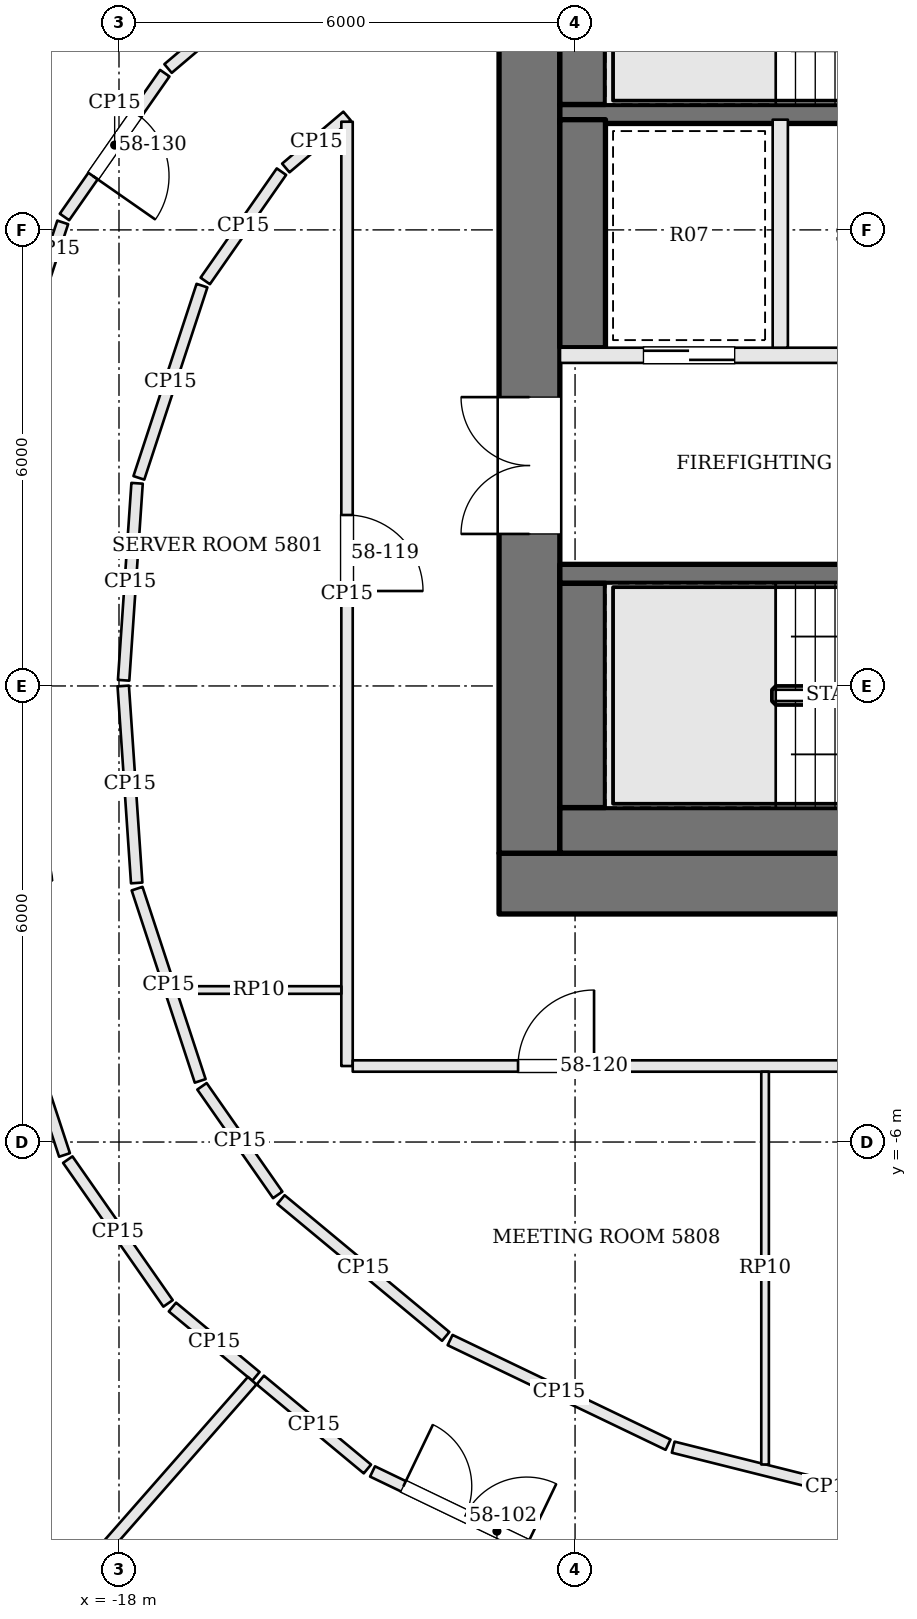
"""IFC4 building model, lengths in metres.
Left out: names, types, materials, properties, quantities, classifications, styles, units other than length and angle.
Written with IfcOpenShell. Run it as: python <this file> out.ifc"""

import sys

from ifc_helpers import new_model, si_unit, direction, frame, frame_2d, origin, place, context, subcontext, project, spatial, rectangle, extrude, element, fill, save


model = new_model("IFC4")
c1 = context("Model", 3, precision=1e-05, world=origin(), true_north=direction((0.0, 1.0)))
c2 = subcontext(c1, "Body", "Model", "MODEL_VIEW")
j1 = project(units=[si_unit("LENGTHUNIT", "METRE"), si_unit("PLANEANGLEUNIT", "RADIAN")], contexts=[c1])
p1 = place(None, origin())
s1 = spatial("IfcSite", under=j1, at=p1, CompositionType="ELEMENT")
p2 = place(p1, origin())
s2 = spatial("IfcBuilding", under=s1, at=p2, CompositionType="ELEMENT")
p3 = place(p2, frame((0.0, 0.0, 237.0)))
s3 = spatial("IfcBuildingStorey", under=s2, at=p3, CompositionType="ELEMENT", Elevation=237.0)
p4 = place(p3, frame((-13.0, -2.6, 0.0), z_axis=(0.0, 0.0, 1.0), x_axis=(1.0, 0.0, 0.0)))
e1 = element("IfcWall", 1, at=p4, inside=s3, PredefinedType="SHEAR", context=c2, shape_type="SweptSolid", body=[
    extrude(rectangle(XDim=26.0, YDim=0.8, at=frame_2d((13.0, 0.0))), origin(), (0.0, 0.0, 1.0), 3.9),
])
p5 = place(p4, frame((8.5, 0.0, 0.0)))
e2 = element("IfcOpeningElement", 2, at=p5, cuts=e1, PredefinedType="OPENING", context=c2, shape_type="SweptSolid", body=[
    extrude(rectangle(XDim=1.0, YDim=2.1, at=frame_2d((0.5, 1.05))), frame((0.0, 0.41, 0.0), z_axis=(0.0, -1.0, 0.0), x_axis=(1.0, 0.0, 0.0)), (0.0, 0.0, 1.0), 0.82),
])
p6 = place(p4, frame((11.025, 0.0, 0.0)))
e3 = element("IfcOpeningElement", 3, at=p6, cuts=e1, PredefinedType="OPENING", context=c2, shape_type="SweptSolid", body=[
    extrude(rectangle(XDim=0.9, YDim=2.1, at=frame_2d((0.45, 1.05))), frame((0.0, 0.41, 0.0), z_axis=(0.0, -1.0, 0.0), x_axis=(1.0, 0.0, 0.0)), (0.0, 0.0, 1.0), 0.82),
])
p7 = place(p4, frame((14.225, 0.0, 0.0)))
e4 = element("IfcOpeningElement", 4, at=p7, cuts=e1, PredefinedType="OPENING", context=c2, shape_type="SweptSolid", body=[
    extrude(rectangle(XDim=0.9, YDim=2.1, at=frame_2d((0.45, 1.05))), frame((0.0, 0.41, 0.0), z_axis=(0.0, -1.0, 0.0), x_axis=(1.0, 0.0, 0.0)), (0.0, 0.0, 1.0), 0.82),
])
p8 = place(p4, frame((16.6, 0.0, 0.0)))
e5 = element("IfcOpeningElement", 5, at=p8, cuts=e1, PredefinedType="OPENING", context=c2, shape_type="SweptSolid", body=[
    extrude(rectangle(XDim=1.0, YDim=2.1, at=frame_2d((0.5, 1.05))), frame((0.0, 0.41, 0.0), z_axis=(0.0, -1.0, 0.0), x_axis=(1.0, 0.0, 0.0)), (0.0, 0.0, 1.0), 0.82),
])
p9 = place(p3, frame((-12.6, -2.2, 0.0), z_axis=(0.0, 0.0, 1.0), x_axis=(0.0, 1.0, 0.0)))
e6 = element("IfcWall", 6, at=p9, inside=s3, PredefinedType="SHEAR", context=c2, shape_type="SweptSolid", body=[
    extrude(rectangle(XDim=13.4, YDim=0.8, at=frame_2d((6.7, 0.0))), origin(), (0.0, 0.0, 1.0), 3.9),
])
p10 = place(p9, frame((4.2, 0.0, 0.0)))
e7 = element("IfcOpeningElement", 7, at=p10, cuts=e6, PredefinedType="OPENING", context=c2, shape_type="SweptSolid", body=[
    extrude(rectangle(XDim=1.8, YDim=2.1, at=frame_2d((0.9, 1.05))), frame((0.0, 0.41, 0.0), z_axis=(0.0, -1.0, 0.0), x_axis=(1.0, 0.0, 0.0)), (0.0, 0.0, 1.0), 0.82),
])
p11 = place(p3, frame((-12.2, 1.475, 0.0), z_axis=(0.0, 0.0, 1.0), x_axis=(1.0, 0.0, 0.0)))
e8 = element("IfcWall", 8, at=p11, inside=s3, PredefinedType="SOLIDWALL", context=c2, shape_type="SweptSolid", body=[
    extrude(rectangle(XDim=7.1, YDim=0.25, at=frame_2d((3.55, 0.0))), origin(), (0.0, 0.0, 1.0), 3.7),
])
p12 = place(p11, frame((5.8, 0.0, 0.0)))
e9 = element("IfcOpeningElement", 9, at=p12, cuts=e8, PredefinedType="OPENING", context=c2, shape_type="SweptSolid", body=[
    extrude(rectangle(XDim=1.2, YDim=2.1, at=frame_2d((0.6, 1.05))), frame((0.0, 0.135, 0.0), z_axis=(0.0, -1.0, 0.0), x_axis=(1.0, 0.0, 0.0)), (0.0, 0.0, 1.0), 0.27),
])
p13 = place(p3, frame((-12.2, 4.35, 0.0), z_axis=(0.0, 0.0, 1.0), x_axis=(1.0, 0.0, 0.0)))
e10 = element("IfcWall", 10, at=p13, inside=s3, PredefinedType="SOLIDWALL", context=c2, shape_type="SweptSolid", body=[
    extrude(rectangle(XDim=7.1, YDim=0.2, at=frame_2d((3.55, 0.0))), origin(), (0.0, 0.0, 1.0), 3.7),
])
p14 = place(p13, frame((4.4, 0.0, 0.0)))
e11 = element("IfcOpeningElement", 11, at=p14, cuts=e10, PredefinedType="OPENING", context=c2, shape_type="SweptSolid", body=[
    extrude(rectangle(XDim=1.2, YDim=2.1, at=frame_2d((0.6, 1.05))), frame((0.0, 0.11, 0.0), z_axis=(0.0, -1.0, 0.0), x_axis=(1.0, 0.0, 0.0)), (0.0, 0.0, 1.0), 0.22),
])
p15 = place(p13, frame((1.1, 0.0, 0.0)))
e12 = element("IfcOpeningElement", 12, at=p15, cuts=e10, PredefinedType="OPENING", context=c2, shape_type="SweptSolid", body=[
    extrude(rectangle(XDim=1.2, YDim=2.1, at=frame_2d((0.6, 1.05))), frame((0.0, 0.11, 0.0), z_axis=(0.0, -1.0, 0.0), x_axis=(1.0, 0.0, 0.0)), (0.0, 0.0, 1.0), 0.22),
])
p16 = place(p3, frame((-12.2, 7.525, 0.0), z_axis=(0.0, 0.0, 1.0), x_axis=(1.0, 0.0, 0.0)))
e13 = element("IfcWall", 13, at=p16, inside=s3, PredefinedType="SOLIDWALL", context=c2, shape_type="SweptSolid", body=[
    extrude(rectangle(XDim=7.1, YDim=0.25, at=frame_2d((3.55, 0.0))), origin(), (0.0, 0.0, 1.0), 3.7),
])
p17 = place(p16, frame((5.8, 0.0, 0.0)))
e14 = element("IfcOpeningElement", 14, at=p17, cuts=e13, PredefinedType="OPENING", context=c2, shape_type="SweptSolid", body=[
    extrude(rectangle(XDim=1.2, YDim=2.1, at=frame_2d((0.6, 1.05))), frame((0.0, 0.135, 0.0), z_axis=(0.0, -1.0, 0.0), x_axis=(1.0, 0.0, 0.0)), (0.0, 0.0, 1.0), 0.27),
])
p18 = place(p3, frame((-9.3, 4.45, 0.0), z_axis=(0.0, 0.0, 1.0), x_axis=(0.0, 1.0, 0.0)))
e15 = element("IfcWall", 15, at=p18, inside=s3, PredefinedType="SOLIDWALL", context=c2, shape_type="SweptSolid", body=[
    extrude(rectangle(XDim=3.0, YDim=0.2, at=frame_2d((1.5, 0.0))), origin(), (0.0, 0.0, 1.0), 3.7),
])
p19 = place(p3, frame((-12.2, -1.9, 0.0), z_axis=(0.0, 0.0, 1.0), x_axis=(1.0, 0.0, 0.0)))
e16 = element("IfcWall", 16, at=p19, inside=s3, PredefinedType="SOLIDWALL", context=c2, shape_type="SweptSolid", body=[
    extrude(rectangle(XDim=7.1, YDim=0.6, at=frame_2d((3.55, 0.0))), origin(), (0.0, 0.0, 1.0), 3.7),
])
p20 = place(p3, frame((-11.9, -1.6, 0.0), z_axis=(0.0, 0.0, 1.0), x_axis=(0.0, 1.0, 0.0)))
e17 = element("IfcWall", 17, at=p20, inside=s3, PredefinedType="SOLIDWALL", context=c2, shape_type="SweptSolid", body=[
    extrude(rectangle(XDim=2.95, YDim=0.6, at=frame_2d((1.475, 0.0))), origin(), (0.0, 0.0, 1.0), 3.7),
])
p21 = place(p3, frame((-11.9, 4.45, 0.0), z_axis=(0.0, 0.0, 1.0), x_axis=(0.0, 1.0, 0.0)))
e18 = element("IfcWall", 18, at=p21, inside=s3, PredefinedType="SOLIDWALL", context=c2, shape_type="SweptSolid", body=[
    extrude(rectangle(XDim=3.0, YDim=0.6, at=frame_2d((1.5, 0.0))), origin(), (0.0, 0.0, 1.0), 3.7),
])
p22 = place(p3, frame((-11.9, 7.65, 0.0), z_axis=(0.0, 0.0, 1.0), x_axis=(0.0, 1.0, 0.0)))
e19 = element("IfcWall", 19, at=p22, inside=s3, PredefinedType="SOLIDWALL", context=c2, shape_type="SweptSolid", body=[
    extrude(rectangle(XDim=2.95, YDim=0.6, at=frame_2d((1.475, 0.0))), origin(), (0.0, 0.0, 1.0), 3.7),
])
p23 = place(p3, frame((-19.717, -3.124, 0.0), z_axis=(0.0, 0.0, 1.0), x_axis=(0.31188427026, -0.950120098706, 0.0)))
e20 = element("IfcWall", 20, at=p23, inside=s3, PredefinedType="PARTITIONING", context=c2, shape_type="SweptSolid", body=[
    extrude(rectangle(XDim=3.206, YDim=0.15, at=frame_2d((1.603, 0.0))), origin(), (0.0, 0.0, 1.0), 3.084),
])
p24 = place(p3, frame((-18.674, -6.232, 0.0), z_axis=(0.0, 0.0, 1.0), x_axis=(0.572118665737, -0.820170855563, 0.0)))
e21 = element("IfcWall", 21, at=p24, inside=s3, PredefinedType="PARTITIONING", context=c2, shape_type="SweptSolid", body=[
    extrude(rectangle(XDim=2.306, YDim=0.15, at=frame_2d((1.153, 0.0))), origin(), (0.0, 0.0, 1.0), 3.084),
])
p25 = place(p3, frame((-17.297, -8.171, 0.0), z_axis=(0.0, 0.0, 1.0), x_axis=(0.769229150867, -0.638973014654, 0.0)))
e22 = element("IfcWall", 22, at=p25, inside=s3, PredefinedType="PARTITIONING", context=c2, shape_type="SweptSolid", body=[
    extrude(rectangle(XDim=1.428, YDim=0.15, at=frame_2d((0.714, 0.0))), origin(), (0.0, 0.0, 1.0), 3.084),
])
p26 = place(p3, frame((-21.493, -15.114, 0.0), z_axis=(0.0, 0.0, 1.0), x_axis=(0.659784254939, 0.751455079785, 0.0)))
e23 = element("IfcWall", 23, at=p26, inside=s3, PredefinedType="PARTITIONING", context=c2, shape_type="SweptSolid", body=[
    extrude(rectangle(XDim=7.95, YDim=0.15, at=frame_2d((3.975, 0.0))), origin(), (0.0, 0.0, 1.0), 3.184),
])
p27 = place(p3, frame((-16.141, -9.131, 0.0), z_axis=(0.0, 0.0, 1.0), x_axis=(0.769225656115, -0.638977221796, 0.0)))
e24 = element("IfcWall", 24, at=p27, inside=s3, PredefinedType="PARTITIONING", context=c2, shape_type="SweptSolid", body=[
    extrude(rectangle(XDim=1.831, YDim=0.15, at=frame_2d((0.916, 0.0))), origin(), (0.0, 0.0, 1.0), 3.084),
])
p28 = place(p3, frame((-14.664, -10.334, 0.0), z_axis=(0.0, 0.0, 1.0), x_axis=(0.901507315282, -0.432763862278, 0.0)))
e25 = element("IfcWall", 25, at=p28, inside=s3, PredefinedType="PARTITIONING", context=c2, shape_type="SweptSolid", body=[
    extrude(rectangle(XDim=3.63, YDim=0.15, at=frame_2d((1.815, 0.0))), origin(), (0.0, 0.0, 1.0), 3.084),
])
p29 = place(p28, frame((0.45, 0.0, 0.0)))
e26 = element("IfcOpeningElement", 26, at=p29, cuts=e25, PredefinedType="OPENING", context=c2, shape_type="SweptSolid", body=[
    extrude(rectangle(XDim=1.8, YDim=2.1, at=frame_2d((0.9, 1.05))), frame((0.0, 0.085, 0.0), z_axis=(0.0, -1.0, 0.0), x_axis=(1.0, 0.0, 0.0)), (0.0, 0.0, 1.0), 0.17),
])
p30 = place(p3, frame((-15.057, 10.073, 0.0), z_axis=(0.0, 0.0, 1.0), x_axis=(-0.762398905861, -0.647107339119, 0.0)))
e27 = element("IfcWall", 27, at=p30, inside=s3, PredefinedType="PARTITIONING", context=c2, shape_type="SweptSolid", body=[
    extrude(rectangle(XDim=3.013, YDim=0.15, at=frame_2d((1.507, 0.0))), origin(), (0.0, 0.0, 1.0), 3.084),
])
p31 = place(p3, frame((-17.397, 8.062, 0.0), z_axis=(0.0, 0.0, 1.0), x_axis=(-0.572118665737, -0.820170855563, 0.0)))
e28 = element("IfcWall", 28, at=p31, inside=s3, PredefinedType="PARTITIONING", context=c2, shape_type="SweptSolid", body=[
    extrude(rectangle(XDim=2.306, YDim=0.15, at=frame_2d((1.153, 0.0))), origin(), (0.0, 0.0, 1.0), 3.084),
])
p32 = place(p31, frame((0.65, 0.0, 0.0)))
e29 = element("IfcOpeningElement", 29, at=p32, cuts=e28, PredefinedType="OPENING", context=c2, shape_type="SweptSolid", body=[
    extrude(rectangle(XDim=1.0, YDim=2.1, at=frame_2d((0.5, 1.05))), frame((0.0, 0.085, 0.0), z_axis=(0.0, -1.0, 0.0), x_axis=(1.0, 0.0, 0.0)), (0.0, 0.0, 1.0), 0.17),
])
p33 = place(p3, frame((-18.74, 6.099, 0.0), z_axis=(0.0, 0.0, 1.0), x_axis=(-0.311930077778, -0.95010506081, 0.0)))
e30 = element("IfcWall", 30, at=p33, inside=s3, PredefinedType="PARTITIONING", context=c2, shape_type="SweptSolid", body=[
    extrude(rectangle(XDim=0.733, YDim=0.15, at=frame_2d((0.367, 0.0))), origin(), (0.0, 0.0, 1.0), 3.084),
])
p34 = place(p3, frame((-6.553, -11.056, 0.0), z_axis=(0.0, 0.0, 1.0), x_axis=(-0.970004917182, 0.243085294995, 0.0)))
e31 = element("IfcWall", 31, at=p34, inside=s3, PredefinedType="PARTITIONING", context=c2, shape_type="SweptSolid", body=[
    extrude(rectangle(XDim=4.284, YDim=0.15, at=frame_2d((2.142, 0.0))), origin(), (0.0, 0.0, 1.0), 3.084),
])
p35 = place(p3, frame((-10.776, -9.982, 0.0), z_axis=(0.0, 0.0, 1.0), x_axis=(-0.901511079436, 0.432756020933, 0.0)))
e32 = element("IfcWall", 32, at=p35, inside=s3, PredefinedType="PARTITIONING", context=c2, shape_type="SweptSolid", body=[
    extrude(rectangle(XDim=3.181, YDim=0.15, at=frame_2d((1.59, 0.0))), origin(), (0.0, 0.0, 1.0), 3.084),
])
p36 = place(p3, frame((-13.702, -8.557, 0.0), z_axis=(0.0, 0.0, 1.0), x_axis=(-0.769221825067, 0.638981833733, 0.0)))
e33 = element("IfcWall", 33, at=p36, inside=s3, PredefinedType="PARTITIONING", context=c2, shape_type="SweptSolid", body=[
    extrude(rectangle(XDim=2.817, YDim=0.15, at=frame_2d((1.409, 0.0))), origin(), (0.0, 0.0, 1.0), 3.084),
])
p37 = place(p3, frame((-15.912, -6.696, 0.0), z_axis=(0.0, 0.0, 1.0), x_axis=(-0.572078533763, 0.820198848578, 0.0)))
e34 = element("IfcWall", 34, at=p37, inside=s3, PredefinedType="PARTITIONING", context=c2, shape_type="SweptSolid", body=[
    extrude(rectangle(XDim=1.742, YDim=0.15, at=frame_2d((0.871, 0.0))), origin(), (0.0, 0.0, 1.0), 3.084),
])
p38 = place(p3, frame((-16.932, -5.196, 0.0), z_axis=(0.0, 0.0, 1.0), x_axis=(-0.311904957484, 0.950113307715, 0.0)))
e35 = element("IfcWall", 35, at=p38, inside=s3, PredefinedType="PARTITIONING", context=c2, shape_type="SweptSolid", body=[
    extrude(rectangle(XDim=2.662, YDim=0.15, at=frame_2d((1.331, 0.0))), origin(), (0.0, 0.0, 1.0), 3.084),
])
p39 = place(p3, frame((-17.767, -2.592, 0.0), z_axis=(0.0, 0.0, 1.0), x_axis=(-0.068140828228, 0.997675712608, 0.0)))
e36 = element("IfcWall", 36, at=p39, inside=s3, PredefinedType="PARTITIONING", context=c2, shape_type="SweptSolid", body=[
    extrude(rectangle(XDim=2.598, YDim=0.15, at=frame_2d((1.299, 0.0))), origin(), (0.0, 0.0, 1.0), 3.084),
])
p40 = place(p3, frame((-17.939, 0.075, 0.0), z_axis=(0.0, 0.0, 1.0), x_axis=(0.068227980697, 0.997669756307, 0.0)))
e37 = element("IfcWall", 37, at=p40, inside=s3, PredefinedType="PARTITIONING", context=c2, shape_type="SweptSolid", body=[
    extrude(rectangle(XDim=2.598, YDim=0.15, at=frame_2d((1.299, 0.0))), origin(), (0.0, 0.0, 1.0), 3.084),
])
p41 = place(p3, frame((-17.739, 2.738, 0.0), z_axis=(0.0, 0.0, 1.0), x_axis=(0.311904957484, 0.950113307715, 0.0)))
e38 = element("IfcWall", 38, at=p41, inside=s3, PredefinedType="PARTITIONING", context=c2, shape_type="SweptSolid", body=[
    extrude(rectangle(XDim=2.662, YDim=0.15, at=frame_2d((1.331, 0.0))), origin(), (0.0, 0.0, 1.0), 3.084),
])
p42 = place(p3, frame((-16.865, 5.329, 0.0), z_axis=(0.0, 0.0, 1.0), x_axis=(0.572096615639, 0.820186236397, 0.0)))
e39 = element("IfcWall", 39, at=p42, inside=s3, PredefinedType="PARTITIONING", context=c2, shape_type="SweptSolid", body=[
    extrude(rectangle(XDim=1.753, YDim=0.15, at=frame_2d((0.876, 0.0))), origin(), (0.0, 0.0, 1.0), 3.084),
])
p43 = place(p3, frame((-15.805, 6.814, 0.0), z_axis=(0.0, 0.0, 1.0), x_axis=(0.762298381233, 0.647225755027, 0.0)))
e40 = element("IfcWall", 40, at=p43, inside=s3, PredefinedType="PARTITIONING", context=c2, shape_type="SweptSolid", body=[
    extrude(rectangle(XDim=1.057, YDim=0.15, at=frame_2d((0.528, 0.0))), origin(), (0.0, 0.0, 1.0), 3.084),
])
p44 = place(p3, frame((-15.0, 7.423, 0.0), z_axis=(0.0, 0.0, 1.0), x_axis=(0.0, -1.0, 0.0)))
e41 = element("IfcWall", 41, at=p44, inside=s3, PredefinedType="PARTITIONING", context=c2, shape_type="SweptSolid", body=[
    extrude(rectangle(XDim=12.423, YDim=0.15, at=frame_2d((6.211, 0.0))), origin(), (0.0, 0.0, 1.0), 3.084),
])
p45 = place(p44, frame((5.174, 0.0, 0.0)))
e42 = element("IfcOpeningElement", 42, at=p45, cuts=e41, PredefinedType="OPENING", context=c2, shape_type="SweptSolid", body=[
    extrude(rectangle(XDim=1.0, YDim=2.1, at=frame_2d((0.5, 1.05))), frame((0.0, 0.085, 0.0), z_axis=(0.0, -1.0, 0.0), x_axis=(1.0, 0.0, 0.0)), (0.0, 0.0, 1.0), 0.17),
])
p46 = place(p3, frame((-14.925, -5.0, 0.0), z_axis=(0.0, 0.0, 1.0), x_axis=(1.0, 0.0, 0.0)))
e43 = element("IfcWall", 43, at=p46, inside=s3, PredefinedType="PARTITIONING", context=c2, shape_type="SweptSolid", body=[
    extrude(rectangle(XDim=29.925, YDim=0.15, at=frame_2d((14.962, 0.0))), origin(), (0.0, 0.0, 1.0), 3.084),
])
p47 = place(p46, frame((2.175, 0.0, 0.0)))
e44 = element("IfcOpeningElement", 44, at=p47, cuts=e43, PredefinedType="OPENING", context=c2, shape_type="SweptSolid", body=[
    extrude(rectangle(XDim=1.0, YDim=2.4, at=frame_2d((0.5, 1.2))), frame((0.0, 0.085, 0.0), z_axis=(0.0, -1.0, 0.0), x_axis=(1.0, 0.0, 0.0)), (0.0, 0.0, 1.0), 0.17),
])
p48 = place(p46, frame((14.025, 0.0, 0.0)))
e45 = element("IfcOpeningElement", 45, at=p48, cuts=e43, PredefinedType="OPENING", context=c2, shape_type="SweptSolid", body=[
    extrude(rectangle(XDim=1.8, YDim=2.1, at=frame_2d((0.9, 1.05))), frame((0.0, 0.085, 0.0), z_axis=(0.0, -1.0, 0.0), x_axis=(1.0, 0.0, 0.0)), (0.0, 0.0, 1.0), 0.17),
])
p49 = place(p46, frame((26.825, 0.0, 0.0)))
e46 = element("IfcOpeningElement", 46, at=p49, cuts=e43, PredefinedType="OPENING", context=c2, shape_type="SweptSolid", body=[
    extrude(rectangle(XDim=0.7, YDim=2.1, at=frame_2d((0.35, 1.05))), frame((0.0, 0.085, 0.0), z_axis=(0.0, -1.0, 0.0), x_axis=(1.0, 0.0, 0.0)), (0.0, 0.0, 1.0), 0.17),
])
p50 = place(p3, frame((-9.5, -10.242, 0.0), z_axis=(0.0, 0.0, 1.0), x_axis=(0.0, 1.0, 0.0)))
e47 = element("IfcWall", 47, at=p50, inside=s3, PredefinedType="PARTITIONING", context=c2, shape_type="SweptSolid", body=[
    extrude(rectangle(XDim=5.167, YDim=0.1, at=frame_2d((2.583, 0.0))), origin(), (0.0, 0.0, 1.0), 3.084),
])
p51 = place(p3, frame((-17.249, -4.0, 0.0), z_axis=(0.0, 0.0, 1.0), x_axis=(1.0, 0.0, 0.0)))
e48 = element("IfcWall", 48, at=p51, inside=s3, PredefinedType="PARTITIONING", context=c2, shape_type="SweptSolid", body=[
    extrude(rectangle(XDim=2.174, YDim=0.1, at=frame_2d((1.087, 0.0))), origin(), (0.0, 0.0, 1.0), 3.084),
])
p52 = place(p10, origin())
e49 = element("IfcDoor", 49, at=p52, inside=s3, OperationType="DOUBLE_DOOR_SINGLE_SWING", PredefinedType="DOOR", context=c2, shape_type="SweptSolid", body=[
    extrude(rectangle(XDim=1.8, YDim=2.1, at=frame_2d((0.9, 1.05))), frame((0.0, 0.025, 0.0), z_axis=(0.0, -1.0, 0.0), x_axis=(1.0, 0.0, 0.0)), (0.0, 0.0, 1.0), 0.05),
])
fill(e7, e49)
p53 = place(p15, origin())
e50 = element("IfcDoor", 50, at=p53, inside=s3, OperationType="SLIDING_TO_RIGHT", PredefinedType="DOOR", context=c2, shape_type="SweptSolid", body=[
    extrude(rectangle(XDim=1.2, YDim=2.1, at=frame_2d((0.6, 1.05))), frame((0.0, 0.025, 0.0), z_axis=(0.0, -1.0, 0.0), x_axis=(1.0, 0.0, 0.0)), (0.0, 0.0, 1.0), 0.05),
])
fill(e12, e50)
p54 = place(p29, origin())
e51 = element("IfcDoor", 51, at=p54, inside=s3, OperationType="DOUBLE_DOOR_SINGLE_SWING", PredefinedType="DOOR", context=c2, shape_type="SweptSolid", body=[
    extrude(rectangle(XDim=1.8, YDim=2.1, at=frame_2d((0.9, 1.05))), frame((0.0, 0.025, 0.0), z_axis=(0.0, -1.0, 0.0), x_axis=(1.0, 0.0, 0.0)), (0.0, 0.0, 1.0), 0.05),
])
fill(e26, e51)
p55 = place(p45, origin())
e52 = element("IfcDoor", 52, at=p55, inside=s3, OperationType="SINGLE_SWING_RIGHT", PredefinedType="DOOR", context=c2, shape_type="SweptSolid", body=[
    extrude(rectangle(XDim=1.0, YDim=2.1, at=frame_2d((0.5, 1.05))), frame((0.0, 0.025, 0.0), z_axis=(0.0, -1.0, 0.0), x_axis=(1.0, 0.0, 0.0)), (0.0, 0.0, 1.0), 0.05),
])
fill(e42, e52)
p56 = place(p47, origin())
e53 = element("IfcDoor", 53, at=p56, inside=s3, OperationType="SINGLE_SWING_RIGHT", PredefinedType="DOOR", context=c2, shape_type="SweptSolid", body=[
    extrude(rectangle(XDim=1.0, YDim=2.4, at=frame_2d((0.5, 1.2))), frame((0.0, 0.025, 0.0), z_axis=(0.0, -1.0, 0.0), x_axis=(1.0, 0.0, 0.0)), (0.0, 0.0, 1.0), 0.05),
])
fill(e44, e53)
p57 = place(p32, origin())
e54 = element("IfcDoor", 54, at=p57, inside=s3, OperationType="SINGLE_SWING_RIGHT", PredefinedType="DOOR", context=c2, shape_type="SweptSolid", body=[
    extrude(rectangle(XDim=1.0, YDim=2.1, at=frame_2d((0.5, 1.05))), frame((0.0, 0.025, 0.0), z_axis=(0.0, -1.0, 0.0), x_axis=(1.0, 0.0, 0.0)), (0.0, 0.0, 1.0), 0.05),
])
fill(e29, e54)
save(model, sys.argv[1])
